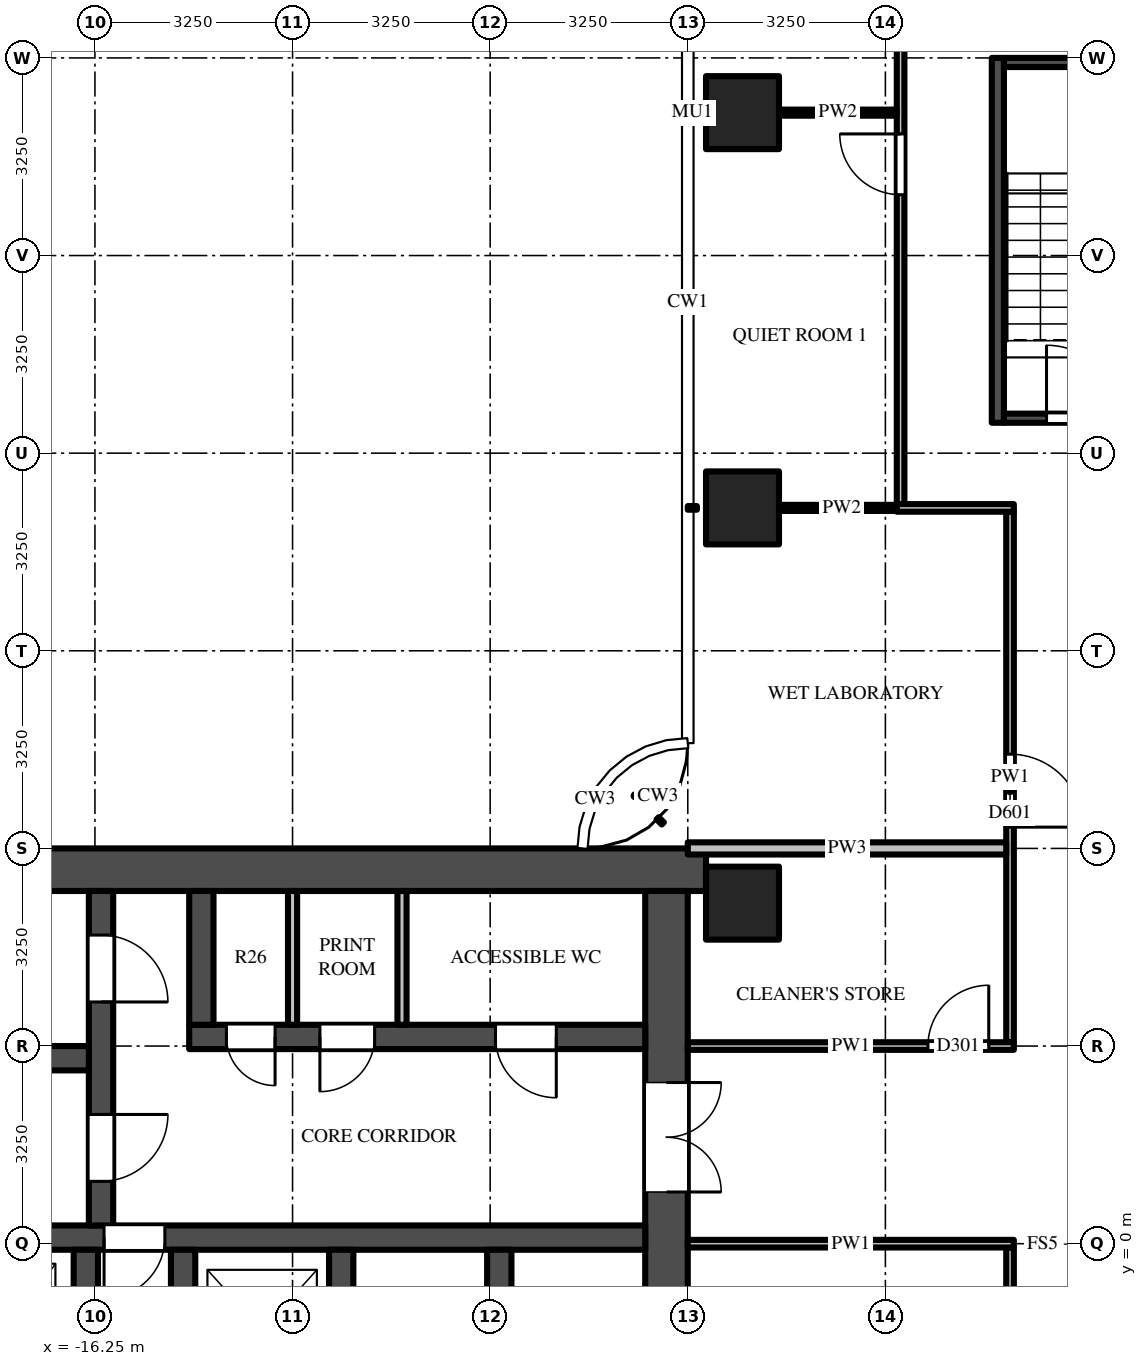
"""IFC4 building model, lengths in metres.
Left out: names, types, materials, properties, quantities, classifications, styles, units other than length and angle.
Written with IfcOpenShell. Run it as: python <this file> out.ifc"""

import sys

from ifc_helpers import new_model, si_unit, direction, frame, frame_2d, origin, origin_2d, place, context, subcontext, project, spatial, rectangle, extrude, source, transform, mapped, element, fill, save


model = new_model("IFC4")
c1 = context("Model", 3, precision=1e-05, world=origin(), true_north=direction((0.0, 1.0)))
c2 = subcontext(c1, "Body", "Model", "MODEL_VIEW")
j1 = project(units=[si_unit("LENGTHUNIT", "METRE"), si_unit("PLANEANGLEUNIT", "RADIAN")], contexts=[c1])
p1 = place(None, origin())
s1 = spatial("IfcSite", under=j1, at=p1, CompositionType="ELEMENT")
p2 = place(p1, origin())
s2 = spatial("IfcBuilding", under=s1, at=p2, CompositionType="ELEMENT")
p3 = place(p2, frame((0.0, 0.0, 173.7)))
s3 = spatial("IfcBuildingStorey", under=s2, at=p3, CompositionType="ELEMENT", Elevation=173.7)
m1 = source(origin(), c2, "Body", "SweptSolid", [
    extrude(rectangle(XDim=1.2, YDim=1.2, at=origin_2d()), origin(), (0.0, 0.0, 1.0), 3.9),
])
for number, where, z_axis, x_axis in (
    (1, (-5.6, 12.1, 0.0), (0.0, 0.0, 1.0), (1.0, 0.0, 0.0)),
    (2, (-5.6, 18.6, 0.0), (0.0, 0.0, 1.0), (1.0, 0.0, 0.0)),
    (3, (-5.6, 5.6, 0.0), (0.0, 0.0, 1.0), (1.0, 0.0, 0.0)),
):
    element("IfcColumn", number, at=place(p3, frame(where, z_axis=z_axis, x_axis=x_axis)), inside=s3, PredefinedType="COLUMN", context=c2, shape_type="MappedRepresentation", body=[
        mapped(m1, transform((0.0, 0.0, 0.0))),
    ])
m2 = source(origin(), c2, "Body", "SweptSolid", [
    extrude(rectangle(XDim=16.55, YDim=0.7, at=frame_2d((8.275, 0.0))), origin(), (0.0, 0.0, 1.0), 3.7),
])
p4 = place(p3, frame((-6.2, 6.15, 0.0), z_axis=(0.0, 0.0, 1.0), x_axis=(-1.0, 0.0, 0.0)))
e4 = element("IfcWall", 4, at=p4, inside=s3, PredefinedType="SHEAR", context=c2, shape_type="MappedRepresentation", body=[
    mapped(m2, transform((0.0, 0.0, 0.0))),
])
m3 = source(origin(), c2, "Body", "SweptSolid", [
    extrude(rectangle(XDim=9.05, YDim=0.7, at=frame_2d((4.525, 0.0))), origin(), (0.0, 0.0, 1.0), 3.7),
])
p5 = place(p3, frame((-6.85, 5.8, 0.0), z_axis=(0.0, 0.0, 1.0), x_axis=(0.0, -1.0, 0.0)))
e5 = element("IfcWall", 5, at=p5, inside=s3, PredefinedType="SHEAR", context=c2, shape_type="MappedRepresentation", body=[
    mapped(m3, transform((0.0, 0.0, 0.0))),
])
m4 = source(origin(), c2, "Body", "SweptSolid", [
    extrude(rectangle(XDim=1.8, YDim=2.1, at=frame_2d((0.9, 1.05))), frame((0.0, 0.36, 0.0), z_axis=(0.0, -1.0, 0.0), x_axis=(1.0, 0.0, 0.0)), (0.0, 0.0, 1.0), 0.72),
])
p6 = place(p5, frame((3.15, 0.0, 0.0)))
e6 = element("IfcOpeningElement", 6, at=p6, cuts=e5, PredefinedType="OPENING", context=c2, shape_type="MappedRepresentation", body=[
    mapped(m4, transform((0.0, 0.0, 0.0))),
])
m5 = source(origin(), c2, "Body", "SweptSolid", [
    extrude(rectangle(XDim=7.5, YDim=0.4, at=frame_2d((3.75, 0.0))), origin(), (0.0, 0.0, 1.0), 3.7),
])
p7 = place(p3, frame((-7.2, 3.4, 0.0), z_axis=(0.0, 0.0, 1.0), x_axis=(-1.0, 0.0, 0.0)))
e7 = element("IfcWall", 7, at=p7, inside=s3, PredefinedType="SHEAR", context=c2, shape_type="MappedRepresentation", body=[
    mapped(m5, transform((0.0, 0.0, 0.0))),
])
m6 = source(origin(), c2, "Body", "SweptSolid", [
    extrude(rectangle(XDim=1.0, YDim=2.1, at=frame_2d((0.5, 1.05))), frame((0.0, 0.21, 0.0), z_axis=(0.0, -1.0, 0.0), x_axis=(1.0, 0.0, 0.0)), (0.0, 0.0, 1.0), 0.42),
])
p8 = place(p7, frame((1.462, 0.0, 0.0)))
e8 = element("IfcOpeningElement", 8, at=p8, cuts=e7, PredefinedType="OPENING", context=c2, shape_type="MappedRepresentation", body=[
    mapped(m6, transform((0.0, 0.0, 0.0))),
])
m7 = source(origin(), c2, "Body", "SweptSolid", [
    extrude(rectangle(XDim=0.9, YDim=2.1, at=frame_2d((0.45, 1.05))), frame((0.0, 0.21, 0.0), z_axis=(0.0, -1.0, 0.0), x_axis=(1.0, 0.0, 0.0)), (0.0, 0.0, 1.0), 0.42),
])
p9 = place(p7, frame((4.45, 0.0, 0.0)))
e9 = element("IfcOpeningElement", 9, at=p9, cuts=e7, PredefinedType="OPENING", context=c2, shape_type="MappedRepresentation", body=[
    mapped(m7, transform((0.0, 0.0, 0.0))),
])
m8 = source(origin(), c2, "Body", "SweptSolid", [
    extrude(rectangle(XDim=0.8, YDim=2.1, at=frame_2d((0.4, 1.05))), frame((0.0, 0.21, 0.0), z_axis=(0.0, -1.0, 0.0), x_axis=(1.0, 0.0, 0.0)), (0.0, 0.0, 1.0), 0.42),
])
p10 = place(p7, frame((6.087, 0.0, 0.0)))
e10 = element("IfcOpeningElement", 10, at=p10, cuts=e7, PredefinedType="OPENING", context=c2, shape_type="MappedRepresentation", body=[
    mapped(m8, transform((0.0, 0.0, 0.0))),
])
m9 = source(origin(), c2, "Body", "SweptSolid", [
    extrude(rectangle(XDim=14.85, YDim=0.4, at=frame_2d((7.425, 0.0))), origin(), (0.0, 0.0, 1.0), 3.7),
])
p11 = place(p3, frame((-7.2, 0.1, 0.0), z_axis=(0.0, 0.0, 1.0), x_axis=(-1.0, 0.0, 0.0)))
e11 = element("IfcWall", 11, at=p11, inside=s3, PredefinedType="SHEAR", context=c2, shape_type="MappedRepresentation", body=[
    mapped(m9, transform((0.0, 0.0, 0.0))),
])
p12 = place(p11, frame((7.9, 0.0, 0.0)))
e12 = element("IfcOpeningElement", 12, at=p12, cuts=e11, PredefinedType="OPENING", context=c2, shape_type="MappedRepresentation", body=[
    mapped(m6, transform((0.0, 0.0, 0.0))),
])
m10 = source(origin(), c2, "Body", "SweptSolid", [
    extrude(rectangle(XDim=5.5, YDim=0.4, at=frame_2d((2.75, 0.0))), origin(), (0.0, 0.0, 1.0), 3.7),
])
p13 = place(p3, frame((-16.15, 5.8, 0.0), z_axis=(0.0, 0.0, 1.0), x_axis=(0.0, -1.0, 0.0)))
e13 = element("IfcWall", 13, at=p13, inside=s3, PredefinedType="SHEAR", context=c2, shape_type="MappedRepresentation", body=[
    mapped(m10, transform((0.0, 0.0, 0.0))),
])
m11 = source(origin(), c2, "Body", "SweptSolid", [
    extrude(rectangle(XDim=1.1, YDim=2.1, at=frame_2d((0.55, 1.05))), frame((0.0, 0.21, 0.0), z_axis=(0.0, -1.0, 0.0), x_axis=(1.0, 0.0, 0.0)), (0.0, 0.0, 1.0), 0.42),
])
p14 = place(p13, frame((0.725, 0.0, 0.0)))
e14 = element("IfcOpeningElement", 14, at=p14, cuts=e13, PredefinedType="OPENING", context=c2, shape_type="MappedRepresentation", body=[
    mapped(m11, transform((0.0, 0.0, 0.0))),
])
p15 = place(p13, frame((3.675, 0.0, 0.0)))
e15 = element("IfcOpeningElement", 15, at=p15, cuts=e13, PredefinedType="OPENING", context=c2, shape_type="MappedRepresentation", body=[
    mapped(m11, transform((0.0, 0.0, 0.0))),
])
m12 = source(origin(), c2, "Body", "SweptSolid", [
    extrude(rectangle(XDim=5.7, YDim=0.4, at=frame_2d((2.85, 0.0))), origin(), (0.0, 0.0, 1.0), 3.7),
])
p16 = place(p3, frame((-16.35, 3.05, 0.0), z_axis=(0.0, 0.0, 1.0), x_axis=(-1.0, 0.0, 0.0)))
e16 = element("IfcWall", 16, at=p16, inside=s3, PredefinedType="SHEAR", context=c2, shape_type="MappedRepresentation", body=[
    mapped(m12, transform((0.0, 0.0, 0.0))),
])
m13 = source(origin(), c2, "Body", "SweptSolid", [
    extrude(rectangle(XDim=2.2, YDim=0.4, at=frame_2d((1.1, 0.0))), origin(), (0.0, 0.0, 1.0), 3.7),
])
p17 = place(p3, frame((-14.5, 5.8, 0.0), z_axis=(0.0, 0.0, 1.0), x_axis=(0.0, -1.0, 0.0)))
e17 = element("IfcWall", 17, at=p17, inside=s3, PredefinedType="SHEAR", context=c2, shape_type="MappedRepresentation", body=[
    mapped(m13, transform((0.0, 0.0, 0.0))),
])
m14 = source(origin(), c2, "Body", "SweptSolid", [
    extrude(rectangle(XDim=2.45, YDim=0.4, at=frame_2d((1.225, 0.0))), origin(), (0.0, 0.0, 1.0), 3.7),
])
for number, where, z_axis, x_axis in (
    (18, (-9.6, -0.1, 0.0), (0.0, 0.0, 1.0), (0.0, -1.0, 0.0)),
    (19, (-12.2, -0.1, 0.0), (0.0, 0.0, 1.0), (0.0, -1.0, 0.0)),
    (20, (-14.8, -0.1, 0.0), (0.0, 0.0, 1.0), (0.0, -1.0, 0.0)),
    (21, (-16.4, -0.1, 0.0), (0.0, 0.0, 1.0), (0.0, -1.0, 0.0)),
):
    element("IfcWall", number, at=place(p3, frame(where, z_axis=z_axis, x_axis=x_axis)), inside=s3, PredefinedType="SHEAR", context=c2, shape_type="MappedRepresentation", body=[
        mapped(m14, transform((0.0, 0.0, 0.0))),
    ])
m15 = source(origin(), c2, "Body", "SweptSolid", [
    extrude(rectangle(XDim=2.2, YDim=0.15, at=frame_2d((1.1, 0.0))), origin(), (0.0, 0.0, 1.0), 3.7),
])
for number, where, z_axis, x_axis in (
    (22, (-11.2, 5.8, 0.0), (0.0, 0.0, 1.0), (0.0, -1.0, 0.0)),
    (23, (-13.0, 5.8, 0.0), (0.0, 0.0, 1.0), (0.0, -1.0, 0.0)),
):
    element("IfcWall", number, at=place(p3, frame(where, z_axis=z_axis, x_axis=x_axis)), inside=s3, PredefinedType="PARTITIONING", context=c2, shape_type="MappedRepresentation", body=[
        mapped(m15, transform((0.0, 0.0, 0.0))),
    ])
m16 = source(origin(), c2, "Body", "SweptSolid", [
    extrude(rectangle(XDim=6.0, YDim=0.2, at=frame_2d((3.0, 0.0))), origin(), (0.0, 0.0, 1.0), 3.7),
])
p18 = place(p3, frame((-1.4, 13.5, 0.0), z_axis=(0.0, 0.0, 1.0), x_axis=(0.0, 1.0, 0.0)))
e24 = element("IfcWall", 24, at=p18, inside=s3, PredefinedType="SHEAR", context=c2, shape_type="MappedRepresentation", body=[
    mapped(m16, transform((0.0, 0.0, 0.0))),
])
m17 = source(origin(), c2, "Body", "SweptSolid", [
    extrude(rectangle(XDim=2.6, YDim=0.15, at=frame_2d((1.3, 0.0))), origin(), (0.0, 0.0, 1.0), 3.7),
])
p19 = place(p3, frame((-1.3, 13.575, 0.0), z_axis=(0.0, 0.0, 1.0), x_axis=(1.0, 0.0, 0.0)))
e25 = element("IfcWall", 25, at=p19, inside=s3, PredefinedType="SHEAR", context=c2, shape_type="MappedRepresentation", body=[
    mapped(m17, transform((0.0, 0.0, 0.0))),
])
m18 = source(origin(), c2, "Body", "SweptSolid", [
    extrude(rectangle(XDim=1.2, YDim=2.1, at=frame_2d((0.6, 1.05))), frame((0.0, 0.085, 0.0), z_axis=(0.0, -1.0, 0.0), x_axis=(1.0, 0.0, 0.0)), (0.0, 0.0, 1.0), 0.17),
])
p20 = place(p19, frame((0.7, 0.0, 0.0)))
e26 = element("IfcOpeningElement", 26, at=p20, cuts=e25, PredefinedType="OPENING", context=c2, shape_type="MappedRepresentation", body=[
    mapped(m18, transform((0.0, 0.0, 0.0))),
])
p21 = place(p3, frame((-1.3, 19.425, 0.0), z_axis=(0.0, 0.0, 1.0), x_axis=(1.0, 0.0, 0.0)))
e27 = element("IfcWall", 27, at=p21, inside=s3, PredefinedType="SHEAR", context=c2, shape_type="MappedRepresentation", body=[
    mapped(m17, transform((0.0, 0.0, 0.0))),
])
m19 = source(origin(), c2, "Body", "SweptSolid", [
    extrude(rectangle(XDim=8.788, YDim=0.125, at=frame_2d((4.394, 0.0))), origin(), (0.0, 0.0, 1.0), 2.997),
])
p22 = place(p3, frame((-3.0, 12.15, 0.0), z_axis=(0.0, 0.0, 1.0), x_axis=(0.0, 1.0, 0.0)))
e28 = element("IfcWall", 28, at=p22, inside=s3, PredefinedType="PARTITIONING", context=c2, shape_type="MappedRepresentation", body=[
    mapped(m19, transform((0.0, 0.0, 0.0))),
])
m20 = source(origin(), c2, "Body", "SweptSolid", [
    extrude(rectangle(XDim=1.0, YDim=2.1, at=frame_2d((0.5, 1.05))), frame((0.0, 0.073, 0.0), z_axis=(0.0, -1.0, 0.0), x_axis=(1.0, 0.0, 0.0)), (0.0, 0.0, 1.0), 0.145),
])
p23 = place(p22, frame((5.1, 0.0, 0.0)))
e29 = element("IfcOpeningElement", 29, at=p23, cuts=e28, PredefinedType="OPENING", context=c2, shape_type="MappedRepresentation", body=[
    mapped(m20, transform((0.0, 0.0, 0.0))),
])
m21 = source(origin(), c2, "Body", "SweptSolid", [
    extrude(rectangle(XDim=3.125, YDim=0.125, at=frame_2d((1.562, 0.0))), origin(), (0.0, 0.0, 1.0), 3.068),
])
p24 = place(p3, frame((-1.2, -0.062, 0.0), z_axis=(0.0, 0.0, 1.0), x_axis=(0.0, -1.0, 0.0)))
e30 = element("IfcWall", 30, at=p24, inside=s3, PredefinedType="PARTITIONING", context=c2, shape_type="MappedRepresentation", body=[
    mapped(m21, transform((0.0, 0.0, 0.0))),
])
m22 = source(origin(), c2, "Body", "SweptSolid", [
    extrude(rectangle(XDim=8.725, YDim=0.125, at=frame_2d((4.363, 0.0))), origin(), (0.0, 0.0, 1.0), 2.997),
])
p25 = place(p3, frame((-1.2, 12.038, 0.0), z_axis=(0.0, 0.0, 1.0), x_axis=(0.0, -1.0, 0.0)))
e31 = element("IfcWall", 31, at=p25, inside=s3, PredefinedType="PARTITIONING", context=c2, shape_type="MappedRepresentation", body=[
    mapped(m22, transform((0.0, 0.0, 0.0))),
])
m23 = source(origin(), c2, "Body", "SweptSolid", [
    extrude(rectangle(XDim=1.2, YDim=2.1, at=frame_2d((0.6, 1.05))), frame((0.0, 0.073, 0.0), z_axis=(0.0, -1.0, 0.0), x_axis=(1.0, 0.0, 0.0)), (0.0, 0.0, 1.0), 0.145),
])
p26 = place(p25, frame((3.988, 0.0, 0.0)))
e32 = element("IfcOpeningElement", 32, at=p26, cuts=e31, PredefinedType="OPENING", context=c2, shape_type="MappedRepresentation", body=[
    mapped(m23, transform((0.0, 0.0, 0.0))),
])
m24 = source(origin(), c2, "Body", "SweptSolid", [
    extrude(rectangle(XDim=5.363, YDim=0.125, at=frame_2d((2.681, 0.0))), origin(), (0.0, 0.0, 1.0), 2.997),
])
p27 = place(p3, frame((-1.137, 0.0, 0.0), z_axis=(0.0, 0.0, 1.0), x_axis=(-1.0, 0.0, 0.0)))
e33 = element("IfcWall", 33, at=p27, inside=s3, PredefinedType="PARTITIONING", context=c2, shape_type="MappedRepresentation", body=[
    mapped(m24, transform((0.0, 0.0, 0.0))),
])
p28 = place(p3, frame((-6.5, 3.25, 0.0), z_axis=(0.0, 0.0, 1.0), x_axis=(1.0, 0.0, 0.0)))
e34 = element("IfcWall", 34, at=p28, inside=s3, PredefinedType="PARTITIONING", context=c2, shape_type="MappedRepresentation", body=[
    mapped(m24, transform((0.0, 0.0, 0.0))),
])
p29 = place(p28, frame((3.95, 0.0, 0.0)))
e35 = element("IfcOpeningElement", 35, at=p29, cuts=e34, PredefinedType="OPENING", context=c2, shape_type="MappedRepresentation", body=[
    mapped(m20, transform((0.0, 0.0, 0.0))),
])
m25 = source(origin(), c2, "Body", "SweptSolid", [
    extrude(rectangle(XDim=5.238, YDim=0.2, at=frame_2d((2.619, 0.0))), origin(), (0.0, 0.0, 1.0), 2.78),
])
p30 = place(p3, frame((-6.5, 6.5, 0.0), z_axis=(0.0, 0.0, 1.0), x_axis=(1.0, 0.0, 0.0)))
e36 = element("IfcWall", 36, at=p30, inside=s3, PredefinedType="PARTITIONING", context=c2, shape_type="MappedRepresentation", body=[
    mapped(m25, transform((0.0, 0.0, 0.0))),
])
m26 = source(origin(), c2, "Body", "SweptSolid", [
    extrude(rectangle(XDim=2.062, YDim=0.1, at=frame_2d((1.031, 0.0))), origin(), (0.0, 0.0, 1.0), 2.997),
])
p31 = place(p3, frame((-5.0, 12.1, 0.0), z_axis=(0.0, 0.0, 1.0), x_axis=(1.0, 0.0, 0.0)))
e37 = element("IfcWall", 37, at=p31, inside=s3, PredefinedType="PARTITIONING", context=c2, shape_type="MappedRepresentation", body=[
    mapped(m26, transform((0.0, 0.0, 0.0))),
])
m27 = source(origin(), c2, "Body", "SweptSolid", [
    extrude(rectangle(XDim=1.925, YDim=0.125, at=frame_2d((0.962, 0.0))), origin(), (0.0, 0.0, 1.0), 2.997),
])
p32 = place(p3, frame((-1.137, 12.1, 0.0), z_axis=(0.0, 0.0, 1.0), x_axis=(-1.0, 0.0, 0.0)))
e38 = element("IfcWall", 38, at=p32, inside=s3, PredefinedType="PARTITIONING", context=c2, shape_type="MappedRepresentation", body=[
    mapped(m27, transform((0.0, 0.0, 0.0))),
])
m28 = source(origin(), c2, "Body", "SweptSolid", [
    extrude(rectangle(XDim=1.938, YDim=0.1, at=frame_2d((0.969, 0.0))), origin(), (0.0, 0.0, 1.0), 3.223),
])
p33 = place(p3, frame((-5.0, 18.6, 0.0), z_axis=(0.0, 0.0, 1.0), x_axis=(1.0, 0.0, 0.0)))
e39 = element("IfcWall", 39, at=p33, inside=s3, PredefinedType="PARTITIONING", context=c2, shape_type="MappedRepresentation", body=[
    mapped(m28, transform((0.0, 0.0, 0.0))),
])
m29 = source(origin(), c2, "Body", "SweptSolid", [
    extrude(rectangle(XDim=1.8, YDim=2.1, at=frame_2d((0.9, 1.05))), frame((0.0, -0.275, 0.0), z_axis=(0.0, -1.0, 0.0), x_axis=(1.0, 0.0, 0.0)), (0.0, 0.0, 1.0), 0.05),
])
p34 = place(p6, origin())
e40 = element("IfcDoor", 40, at=p34, inside=s3, OperationType="DOUBLE_DOOR_SINGLE_SWING", PredefinedType="DOOR", context=c2, shape_type="MappedRepresentation", body=[
    mapped(m29, transform((0.0, 0.0, 0.0))),
])
fill(e6, e40)
m30 = source(origin(), c2, "Body", "SweptSolid", [
    extrude(rectangle(XDim=1.1, YDim=2.1, at=frame_2d((0.55, 1.05))), frame((0.0, 0.025, 0.0), z_axis=(0.0, -1.0, 0.0), x_axis=(1.0, 0.0, 0.0)), (0.0, 0.0, 1.0), 0.05),
])
p35 = place(p14, origin())
e41 = element("IfcDoor", 41, at=p35, inside=s3, OperationType="SINGLE_SWING_RIGHT", PredefinedType="DOOR", context=c2, shape_type="MappedRepresentation", body=[
    mapped(m30, transform((0.0, 0.0, 0.0))),
])
fill(e14, e41)
p36 = place(p15, origin())
e42 = element("IfcDoor", 42, at=p36, inside=s3, OperationType="SINGLE_SWING_LEFT", PredefinedType="DOOR", context=c2, shape_type="MappedRepresentation", body=[
    mapped(m30, transform((0.0, 0.0, 0.0))),
])
fill(e15, e42)
m31 = source(origin(), c2, "Body", "SweptSolid", [
    extrude(rectangle(XDim=1.0, YDim=2.1, at=frame_2d((0.5, 1.05))), frame((0.0, 0.025, 0.0), z_axis=(0.0, -1.0, 0.0), x_axis=(1.0, 0.0, 0.0)), (0.0, 0.0, 1.0), 0.05),
])
p37 = place(p12, origin())
e43 = element("IfcDoor", 43, at=p37, inside=s3, OperationType="SINGLE_SWING_RIGHT", PredefinedType="DOOR", context=c2, shape_type="MappedRepresentation", body=[
    mapped(m31, transform((0.0, 0.0, 0.0))),
])
fill(e12, e43)
p38 = place(p8, origin())
e44 = element("IfcDoor", 44, at=p38, inside=s3, OperationType="SINGLE_SWING_LEFT", PredefinedType="DOOR", context=c2, shape_type="MappedRepresentation", body=[
    mapped(m31, transform((0.0, 0.0, 0.0))),
])
fill(e8, e44)
m32 = source(origin(), c2, "Body", "SweptSolid", [
    extrude(rectangle(XDim=0.9, YDim=2.1, at=frame_2d((0.45, 1.05))), frame((0.0, 0.025, 0.0), z_axis=(0.0, -1.0, 0.0), x_axis=(1.0, 0.0, 0.0)), (0.0, 0.0, 1.0), 0.05),
])
p39 = place(p9, origin())
e45 = element("IfcDoor", 45, at=p39, inside=s3, OperationType="SINGLE_SWING_RIGHT", PredefinedType="DOOR", context=c2, shape_type="MappedRepresentation", body=[
    mapped(m32, transform((0.0, 0.0, 0.0))),
])
fill(e9, e45)
m33 = source(origin(), c2, "Body", "SweptSolid", [
    extrude(rectangle(XDim=0.8, YDim=2.1, at=frame_2d((0.4, 1.05))), frame((0.0, 0.025, 0.0), z_axis=(0.0, -1.0, 0.0), x_axis=(1.0, 0.0, 0.0)), (0.0, 0.0, 1.0), 0.05),
])
p40 = place(p10, origin())
e46 = element("IfcDoor", 46, at=p40, inside=s3, OperationType="SINGLE_SWING_LEFT", PredefinedType="DOOR", context=c2, shape_type="MappedRepresentation", body=[
    mapped(m33, transform((0.0, 0.0, 0.0))),
])
fill(e10, e46)
m34 = source(origin(), c2, "Body", "SweptSolid", [
    extrude(rectangle(XDim=1.2, YDim=2.1, at=frame_2d((0.6, 1.05))), frame((0.0, 0.025, 0.0), z_axis=(0.0, -1.0, 0.0), x_axis=(1.0, 0.0, 0.0)), (0.0, 0.0, 1.0), 0.05),
])
p41 = place(p20, origin())
e47 = element("IfcDoor", 47, at=p41, inside=s3, OperationType="SINGLE_SWING_LEFT", PredefinedType="DOOR", context=c2, shape_type="MappedRepresentation", body=[
    mapped(m34, transform((0.0, 0.0, 0.0))),
])
fill(e26, e47)
p42 = place(p29, origin())
e48 = element("IfcDoor", 48, at=p42, inside=s3, OperationType="SINGLE_SWING_RIGHT", PredefinedType="DOOR", context=c2, shape_type="MappedRepresentation", body=[
    mapped(m31, transform((0.0, 0.0, 0.0))),
])
fill(e35, e48)
p43 = place(p26, origin())
e49 = element("IfcDoor", 49, at=p43, inside=s3, OperationType="SINGLE_SWING_RIGHT", PredefinedType="DOOR", context=c2, shape_type="MappedRepresentation", body=[
    mapped(m34, transform((0.0, 0.0, 0.0))),
])
fill(e32, e49)
p44 = place(p23, origin())
e50 = element("IfcDoor", 50, at=p44, inside=s3, OperationType="SINGLE_SWING_RIGHT", PredefinedType="DOOR", context=c2, shape_type="MappedRepresentation", body=[
    mapped(m31, transform((0.0, 0.0, 0.0))),
])
fill(e29, e50)
save(model, sys.argv[1])
